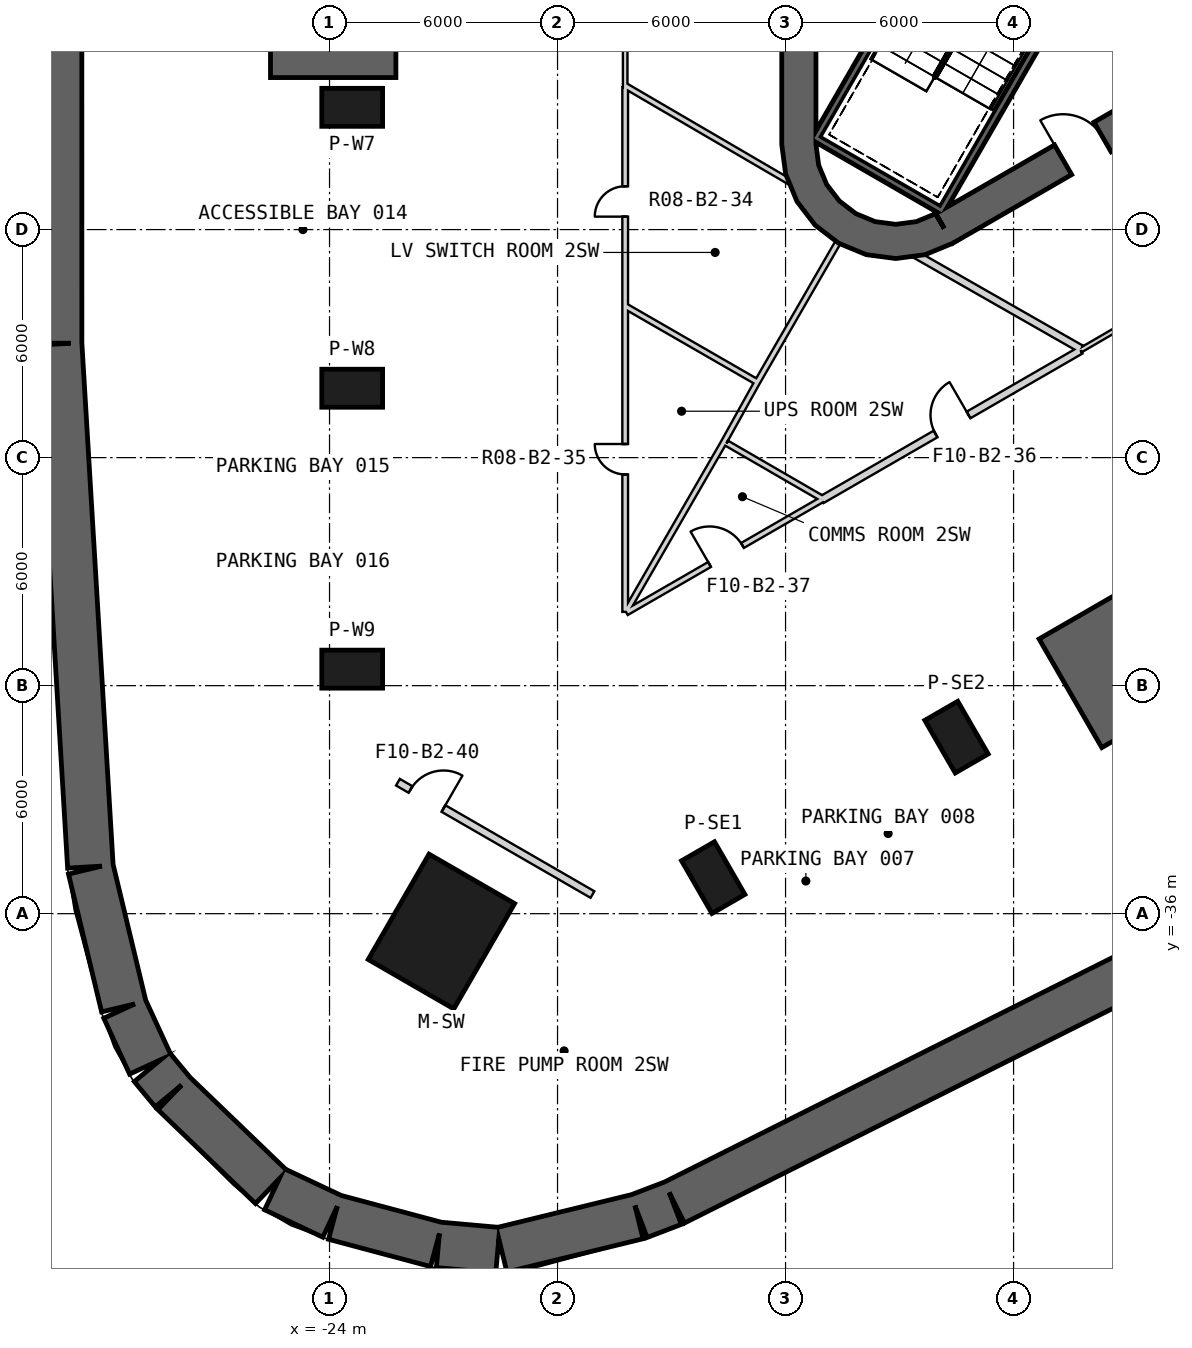
"""IFC4 building model, lengths in metres.
Left out: names, types, materials, properties, quantities, classifications, styles, units other than length and angle.
Written with IfcOpenShell. Run it as: python <this file> out.ifc"""

import sys

from ifc_helpers import new_model, si_unit, direction, frame, frame_2d, origin, origin_2d, place, context, subcontext, project, spatial, polyline, rectangle, outline, extrude, element, fill, save


model = new_model("IFC4")
c1 = context("Model", 3, precision=1e-05, world=origin(), true_north=direction((0.0, 1.0)))
c2 = subcontext(c1, "Body", "Model", "MODEL_VIEW")
j1 = project(units=[si_unit("LENGTHUNIT", "METRE"), si_unit("PLANEANGLEUNIT", "RADIAN")], contexts=[c1])
p1 = place(None, origin())
s1 = spatial("IfcSite", under=j1, at=p1, CompositionType="ELEMENT")
p2 = place(p1, origin())
s2 = spatial("IfcBuilding", under=s1, at=p2, CompositionType="ELEMENT")
p3 = place(p2, frame((0.0, 0.0, -11.0)))
s3 = spatial("IfcBuildingStorey", under=s2, at=p3, CompositionType="ELEMENT", Elevation=-11.0)
p4 = place(p3, frame((-2.344, -37.299, -0.4), z_axis=(0.0, 0.0, 1.0), x_axis=(-0.894066109634, -0.44793503056, 0.0)))
e1 = element("IfcWall", 1, at=p4, inside=s3, PredefinedType="SHEAR", context=c2, shape_type="SweptSolid", body=[
    extrude(rectangle(XDim=14.075, YDim=1.2, at=frame_2d((7.038, 0.0))), origin(), (0.0, 0.0, 1.0), 5.9),
])
p5 = place(p3, frame((-14.956, -43.615, -0.4), z_axis=(0.0, 0.0, 1.0), x_axis=(-0.934009598516, -0.357247910953, 0.0)))
e2 = element("IfcWall", 2, at=p5, inside=s3, PredefinedType="SHEAR", context=c2, shape_type="SweptSolid", body=[
    extrude(rectangle(XDim=0.964, YDim=1.2, at=frame_2d((0.482, 0.0))), origin(), (0.0, 0.0, 1.0), 5.9),
])
p6 = place(p3, frame((-15.892, -43.971, -0.4), z_axis=(0.0, 0.0, 1.0), x_axis=(-0.971425470108, -0.237344804085, 0.0)))
e3 = element("IfcWall", 3, at=p6, inside=s3, PredefinedType="SHEAR", context=c2, shape_type="SweptSolid", body=[
    extrude(rectangle(XDim=3.688, YDim=1.2, at=frame_2d((1.844, 0.0))), origin(), (0.0, 0.0, 1.0), 5.9),
])
p7 = place(p3, frame((-19.573, -44.854, -0.4), z_axis=(0.0, 0.0, 1.0), x_axis=(-0.996059823609, 0.088683864333, 0.0)))
e4 = element("IfcWall", 4, at=p7, inside=s3, PredefinedType="SHEAR", context=c2, shape_type="SweptSolid", body=[
    extrude(rectangle(XDim=1.569, YDim=1.2, at=frame_2d((0.785, 0.0))), origin(), (0.0, 0.0, 1.0), 5.9),
])
p8 = place(p3, frame((-21.186, -44.705, -0.4), z_axis=(0.0, 0.0, 1.0), x_axis=(-0.966093358166, 0.25819299624, 0.0)))
e5 = element("IfcWall", 5, at=p8, inside=s3, PredefinedType="SHEAR", context=c2, shape_type="SweptSolid", body=[
    extrude(rectangle(XDim=2.779, YDim=1.2, at=frame_2d((1.39, 0.0))), origin(), (0.0, 0.0, 1.0), 5.9),
])
p9 = place(p3, frame((-23.921, -43.969, -0.4), z_axis=(0.0, 0.0, 1.0), x_axis=(-0.904821972128, 0.425790087665, 0.0)))
e6 = element("IfcWall", 6, at=p9, inside=s3, PredefinedType="SHEAR", context=c2, shape_type="SweptSolid", body=[
    extrude(rectangle(XDim=1.692, YDim=1.2, at=frame_2d((0.846, 0.0))), origin(), (0.0, 0.0, 1.0), 5.9),
])
p10 = place(p3, frame((-25.533, -43.194, -0.4), z_axis=(0.0, 0.0, 1.0), x_axis=(-0.720885754077, 0.69305391534, 0.0)))
e7 = element("IfcWall", 7, at=p10, inside=s3, PredefinedType="SHEAR", context=c2, shape_type="SweptSolid", body=[
    extrude(rectangle(XDim=3.562, YDim=1.2, at=frame_2d((1.781, 0.0))), origin(), (0.0, 0.0, 1.0), 5.9),
])
p11 = place(p3, frame((-28.123, -40.701, -0.4), z_axis=(0.0, 0.0, 1.0), x_axis=(-0.638405236623, 0.769700431241, 0.0)))
e8 = element("IfcWall", 8, at=p11, inside=s3, PredefinedType="SHEAR", context=c2, shape_type="SweptSolid", body=[
    extrude(rectangle(XDim=0.865, YDim=1.2, at=frame_2d((0.432, 0.0))), origin(), (0.0, 0.0, 1.0), 5.9),
])
p12 = place(p3, frame((-28.717, -39.969, -0.4), z_axis=(0.0, 0.0, 1.0), x_axis=(-0.418752044047, 0.908100614253, 0.0)))
e9 = element("IfcWall", 9, at=p12, inside=s3, PredefinedType="SHEAR", context=c2, shape_type="SweptSolid", body=[
    extrude(rectangle(XDim=1.618, YDim=1.2, at=frame_2d((0.809, 0.0))), origin(), (0.0, 0.0, 1.0), 5.9),
])
p13 = place(p3, frame((-29.414, -38.444, -0.4), z_axis=(0.0, 0.0, 1.0), x_axis=(-0.233605714724, 0.972331409576, 0.0)))
e10 = element("IfcWall", 10, at=p13, inside=s3, PredefinedType="SHEAR", context=c2, shape_type="SweptSolid", body=[
    extrude(rectangle(XDim=3.729, YDim=1.2, at=frame_2d((1.865, 0.0))), origin(), (0.0, 0.0, 1.0), 5.9),
])
p14 = place(p3, frame((-30.292, -34.766, -0.4), z_axis=(0.0, 0.0, 1.0), x_axis=(-0.05979980618, 0.998210390239, 0.0)))
e11 = element("IfcWall", 11, at=p14, inside=s3, PredefinedType="SHEAR", context=c2, shape_type="SweptSolid", body=[
    extrude(rectangle(XDim=13.783, YDim=1.2, at=frame_2d((6.892, 0.0))), origin(), (0.0, 0.0, 1.0), 5.9),
])
p15 = place(p3, frame((-31.117, -20.99, -0.4), z_axis=(0.0, 0.0, 1.0), x_axis=(-6.9786511e-05, 0.999999997565, 0.0)))
e12 = element("IfcWall", 12, at=p15, inside=s3, PredefinedType="SHEAR", context=c2, shape_type="SweptSolid", body=[
    extrude(rectangle(XDim=41.981, YDim=1.2, at=frame_2d((20.99, 0.0))), origin(), (0.0, 0.0, 1.0), 5.9),
])
p16 = place(p3, frame((-21.056, -36.469, -0.4), z_axis=(0.0, 0.0, 1.0), x_axis=(-0.5, -0.866025403784, 0.0)))
e13 = element("IfcColumn", 13, at=p16, inside=s3, PredefinedType="COLUMN", context=c2, shape_type="SweptSolid", body=[
    extrude(rectangle(XDim=3.2, YDim=2.6, at=origin_2d()), origin(), (0.0, 0.0, 1.0), 5.9),
])
for number, where, z_axis, x_axis in (
    (14, (-23.403, -14.783, -0.4), (0.0, 0.0, 1.0), (-1.0, 0.0, 0.0)),
    (15, (-23.403, -22.174, -0.4), (0.0, 0.0, 1.0), (-1.0, 0.0, 0.0)),
    (16, (-23.403, -29.566, -0.4), (0.0, 0.0, 1.0), (-1.0, 0.0, 0.0)),
    (17, (-13.903, -35.051, -0.4), (0.0, 0.0, 1.0), (0.5, -0.866, 0.0)),
    (18, (-7.502, -31.355, -0.4), (0.0, 0.0, 1.0), (0.5, -0.866, 0.0)),
):
    element("IfcColumn", number, at=place(p3, frame(where, z_axis=z_axis, x_axis=x_axis)), inside=s3, PredefinedType="COLUMN", context=c2, shape_type="SweptSolid", body=[
        extrude(rectangle(XDim=1.6, YDim=1.0, at=origin_2d()), origin(), (0.0, 0.0, 1.0), 5.9),
    ])
p17 = place(p3, frame((-11.65, 15.762, -0.4), z_axis=(0.0, 0.0, 1.0), x_axis=(0.0, -1.0, 0.0)))
e19 = element("IfcWall", 19, at=p17, inside=s3, PredefinedType="SHEAR", context=c2, shape_type="SweptSolid", body=[
    extrude(rectangle(XDim=31.523, YDim=0.9, at=frame_2d((15.762, 0.0))), origin(), (0.0, 0.0, 1.0), 5.9),
])
p18 = place(p17, frame((3.612, 0.0, 0.4)))
e20 = element("IfcOpeningElement", 20, at=p18, cuts=e19, PredefinedType="OPENING", context=c2, shape_type="SweptSolid", body=[
    extrude(rectangle(XDim=1.2, YDim=2.4, at=frame_2d((0.6, 1.2))), frame((0.0, 0.46, 0.0), z_axis=(0.0, -1.0, 0.0), x_axis=(1.0, 0.0, 0.0)), (0.0, 0.0, 1.0), 0.92),
])
p19 = place(p17, frame((26.712, 0.0, 0.4)))
e21 = element("IfcOpeningElement", 21, at=p19, cuts=e19, PredefinedType="OPENING", context=c2, shape_type="SweptSolid", body=[
    extrude(rectangle(XDim=1.2, YDim=2.4, at=frame_2d((0.6, 1.2))), frame((0.0, 0.46, 0.0), z_axis=(0.0, -1.0, 0.0), x_axis=(1.0, 0.0, 0.0)), (0.0, 0.0, 1.0), 0.92),
])
p20 = place(p3, frame((-7.825, -17.97, -0.4), z_axis=(0.0, 0.0, 1.0), x_axis=(0.866028369851, 0.499994862586, 0.0)))
e22 = element("IfcWall", 22, at=p20, inside=s3, PredefinedType="SHEAR", context=c2, shape_type="SweptSolid", body=[
    extrude(rectangle(XDim=31.523, YDim=0.9, at=frame_2d((15.762, 0.0))), origin(), (0.0, 0.0, 1.0), 5.9),
])
p21 = place(p20, frame((17.862, 0.0, 0.4)))
e23 = element("IfcOpeningElement", 23, at=p21, cuts=e22, PredefinedType="OPENING", context=c2, shape_type="SweptSolid", body=[
    extrude(rectangle(XDim=1.2, YDim=2.4, at=frame_2d((0.6, 1.2))), frame((0.0, 0.46, 0.0), z_axis=(0.0, -1.0, 0.0), x_axis=(1.0, 0.0, 0.0)), (0.0, 0.0, 1.0), 0.92),
])
p22 = place(p20, frame((20.562, 0.0, 0.4)))
e24 = element("IfcOpeningElement", 24, at=p22, cuts=e22, PredefinedType="OPENING", context=c2, shape_type="SweptSolid", body=[
    extrude(rectangle(XDim=1.2, YDim=2.4, at=frame_2d((0.6, 1.2))), frame((0.0, 0.46, 0.0), z_axis=(0.0, -1.0, 0.0), x_axis=(1.0, 0.0, 0.0)), (0.0, 0.0, 1.0), 0.92),
])
p23 = place(p20, frame((26.712, 0.0, 0.4)))
e25 = element("IfcOpeningElement", 25, at=p23, cuts=e22, PredefinedType="OPENING", context=c2, shape_type="SweptSolid", body=[
    extrude(rectangle(XDim=1.2, YDim=2.4, at=frame_2d((0.6, 1.2))), frame((0.0, 0.46, 0.0), z_axis=(0.0, -1.0, 0.0), x_axis=(1.0, 0.0, 0.0)), (0.0, 0.0, 1.0), 0.92),
])
p24 = place(p20, frame((3.612, 0.0, 0.4)))
e26 = element("IfcOpeningElement", 26, at=p24, cuts=e22, PredefinedType="OPENING", context=c2, shape_type="SweptSolid", body=[
    extrude(rectangle(XDim=1.2, YDim=2.4, at=frame_2d((0.6, 1.2))), frame((0.0, 0.46, 0.0), z_axis=(0.0, -1.0, 0.0), x_axis=(1.0, 0.0, 0.0)), (0.0, 0.0, 1.0), 0.92),
])
p25 = place(p3, frame((0.0, 0.0, -0.4)))
e27 = element("IfcWall", 27, at=p25, inside=s3, PredefinedType="SHEAR", context=c2, shape_type="SweptSolid", body=[
    extrude(outline(polyline([(-12.1, -15.762), (-11.998, -16.538), (-11.698, -17.262), (-11.221, -17.883), (-10.6, -18.36), (-9.876, -18.659), (-9.1, -18.762), (-8.323, -18.659), (-7.6, -18.36), (-8.05, -17.58), (-8.556, -17.79), (-9.1, -17.862), (-9.644, -17.79), (-10.15, -17.58), (-10.585, -17.247), (-10.919, -16.812), (-11.128, -16.305), (-11.2, -15.762), (-12.1, -15.762)])), origin(), (0.0, 0.0, 1.0), 5.9),
])
p26 = place(p3, frame((0.0, 0.0, -0.4)))
e28 = element("IfcWall", 28, at=p26, inside=s3, PredefinedType="SHEAR", context=c2, shape_type="SweptSolid", body=[
    extrude(outline(polyline([(-3.678, -31.63), (-0.214, -29.63), (-1.864, -26.772), (-5.328, -28.772), (-3.678, -31.63)])), origin(), (0.0, 0.0, 1.0), 5.9),
])
p27 = place(p3, frame((0.0, 0.0, -0.4)))
e29 = element("IfcWall", 29, at=p27, inside=s3, PredefinedType="SHEAR", context=c2, shape_type="SweptSolid", body=[
    extrude(outline(polyline([(-25.553, -10.0), (-25.553, -14.0), (-22.253, -14.0), (-22.253, -10.0), (-25.553, -10.0)])), origin(), (0.0, 0.0, 1.0), 5.9),
])
p28 = place(p3, frame((-3.905, -10.563, -0.4), z_axis=(0.0, 0.0, 1.0), x_axis=(-0.500012932018, -0.866017937352, 0.0)))
e30 = element("IfcWall", 30, at=p28, inside=s3, PredefinedType="SHEAR", context=c2, shape_type="SweptSolid", body=[
    extrude(rectangle(XDim=8.1, YDim=0.2, at=frame_2d((4.05, 0.0))), origin(), (0.0, 0.0, 1.0), 5.5),
])
p29 = place(p3, frame((-11.282, -15.541, -0.4), z_axis=(0.0, 0.0, 1.0), x_axis=(0.866000483506, -0.500043160704, 0.0)))
e31 = element("IfcWall", 31, at=p29, inside=s3, PredefinedType="SHEAR", context=c2, shape_type="SweptSolid", body=[
    extrude(rectangle(XDim=3.8, YDim=0.2, at=frame_2d((1.9, 0.0))), origin(), (0.0, 0.0, 1.0), 5.5),
])
p30 = place(p3, frame((-7.196, -8.663, -0.4), z_axis=(0.0, 0.0, 1.0), x_axis=(-0.499997992926, -0.866026562566, 0.0)))
e32 = element("IfcWall", 32, at=p30, inside=s3, PredefinedType="SHEAR", context=c2, shape_type="SweptSolid", body=[
    extrude(rectangle(XDim=7.9, YDim=0.2, at=frame_2d((3.95, 0.0))), origin(), (0.0, 0.0, 1.0), 5.5),
])
p31 = place(p3, frame((-4.26, -11.524, 0.0), z_axis=(0.0, 0.0, 1.0), x_axis=(0.507997497166, -0.861358544901, 0.0)))
e33 = element("IfcWall", 33, at=p31, inside=s3, PredefinedType="PARTITIONING", context=c2, shape_type="SweptSolid", body=[
    extrude(rectangle(XDim=3.35, YDim=0.2, at=frame_2d((1.675, 0.0))), origin(), (0.0, 0.0, 1.0), 5.1),
])
p32 = place(p3, frame((-4.236, -21.175, 0.0), z_axis=(0.0, 0.0, 1.0), x_axis=(0.864433297723, 0.502747524895, 0.0)))
e34 = element("IfcWall", 34, at=p32, inside=s3, PredefinedType="PARTITIONING", context=c2, shape_type="SweptSolid", body=[
    extrude(rectangle(XDim=6.244, YDim=0.12, at=frame_2d((3.122, 0.0))), origin(), (0.0, 0.0, 1.0), 4.68),
])
p33 = place(p3, frame((-16.22, -14.256, 0.0), z_axis=(0.0, 0.0, 1.0), x_axis=(0.0, 1.0, 0.0)))
e35 = element("IfcWall", 35, at=p33, inside=s3, PredefinedType="PARTITIONING", context=c2, shape_type="SweptSolid", body=[
    extrude(rectangle(XDim=28.512, YDim=0.12, at=frame_2d((14.256, 0.0))), origin(), (0.0, 0.0, 1.0), 4.38),
])
p34 = place(p33, frame((7.194, 0.0, 0.0)))
e36 = element("IfcOpeningElement", 36, at=p34, cuts=e35, PredefinedType="OPENING", context=c2, shape_type="SweptSolid", body=[
    extrude(rectangle(XDim=1.2, YDim=2.4, at=frame_2d((0.6, 1.2))), frame((0.0, 0.07, 0.0), z_axis=(0.0, -1.0, 0.0), x_axis=(1.0, 0.0, 0.0)), (0.0, 0.0, 1.0), 0.14),
])
p35 = place(p33, frame((20.194, 0.0, 0.0)))
e37 = element("IfcOpeningElement", 37, at=p35, cuts=e35, PredefinedType="OPENING", context=c2, shape_type="SweptSolid", body=[
    extrude(rectangle(XDim=1.2, YDim=2.4, at=frame_2d((0.6, 1.2))), frame((0.0, 0.07, 0.0), z_axis=(0.0, -1.0, 0.0), x_axis=(1.0, 0.0, 0.0)), (0.0, 0.0, 1.0), 0.14),
])
p36 = place(p3, frame((-16.22, -28.059, 0.0), z_axis=(0.0, 0.0, 1.0), x_axis=(0.0, 1.0, 0.0)))
e38 = element("IfcWall", 38, at=p36, inside=s3, PredefinedType="PLUMBINGWALL", context=c2, shape_type="SweptSolid", body=[
    extrude(rectangle(XDim=13.803, YDim=0.15, at=frame_2d((6.902, 0.0))), origin(), (0.0, 0.0, 1.0), 4.07),
])
p37 = place(p36, frame((10.4, 0.0, 0.0)))
e39 = element("IfcOpeningElement", 39, at=p37, cuts=e38, PredefinedType="OPENING", context=c2, shape_type="SweptSolid", body=[
    extrude(rectangle(XDim=0.8, YDim=2.1, at=frame_2d((0.4, 1.05))), frame((0.0, 0.085, 0.0), z_axis=(0.0, -1.0, 0.0), x_axis=(1.0, 0.0, 0.0)), (0.0, 0.0, 1.0), 0.17),
])
p38 = place(p36, frame((3.617, 0.0, 0.0)))
e40 = element("IfcOpeningElement", 40, at=p38, cuts=e38, PredefinedType="OPENING", context=c2, shape_type="SweptSolid", body=[
    extrude(rectangle(XDim=0.8, YDim=2.1, at=frame_2d((0.4, 1.05))), frame((0.0, 0.085, 0.0), z_axis=(0.0, -1.0, 0.0), x_axis=(1.0, 0.0, 0.0)), (0.0, 0.0, 1.0), 0.17),
])
p39 = place(p3, frame((-11.05, -25.109, 0.0), z_axis=(0.0, 0.0, 1.0), x_axis=(0.866021255939, 0.50000718421, 0.0)))
e41 = element("IfcWall", 41, at=p39, inside=s3, PredefinedType="PARTITIONING", context=c2, shape_type="SweptSolid", body=[
    extrude(rectangle(XDim=7.868, YDim=0.2, at=frame_2d((3.934, 0.0))), origin(), (0.0, 0.0, 1.0), 4.18),
])
p40 = place(p39, frame((3.462, 0.0, 0.0)))
e42 = element("IfcOpeningElement", 42, at=p40, cuts=e41, PredefinedType="OPENING", context=c2, shape_type="SweptSolid", body=[
    extrude(rectangle(XDim=1.0, YDim=2.1, at=frame_2d((0.5, 1.05))), frame((0.0, 0.11, 0.0), z_axis=(0.0, -1.0, 0.0), x_axis=(1.0, 0.0, 0.0)), (0.0, 0.0, 1.0), 0.22),
])
p41 = place(p3, frame((-16.19, -28.077, 0.0), z_axis=(0.0, 0.0, 1.0), x_axis=(0.866017078145, 0.500014420154, 0.0)))
e43 = element("IfcWall", 43, at=p41, inside=s3, PredefinedType="PLUMBINGWALL", context=c2, shape_type="SweptSolid", body=[
    extrude(rectangle(XDim=5.935, YDim=0.15, at=frame_2d((2.968, 0.0))), origin(), (0.0, 0.0, 1.0), 4.07),
])
p42 = place(p41, frame((2.53, 0.0, 0.0)))
e44 = element("IfcOpeningElement", 44, at=p42, cuts=e43, PredefinedType="OPENING", context=c2, shape_type="SweptSolid", body=[
    extrude(rectangle(XDim=1.0, YDim=2.1, at=frame_2d((0.5, 1.05))), frame((0.0, 0.085, 0.0), z_axis=(0.0, -1.0, 0.0), x_axis=(1.0, 0.0, 0.0)), (0.0, 0.0, 1.0), 0.17),
])
p43 = place(p3, frame((-22.2, -32.541, 0.0), z_axis=(0.0, 0.0, 1.0), x_axis=(0.866020498397, -0.500008496284, 0.0)))
e45 = element("IfcWall", 45, at=p43, inside=s3, PredefinedType="PARTITIONING", context=c2, shape_type="SweptSolid", body=[
    extrude(rectangle(XDim=5.911, YDim=0.2, at=frame_2d((2.955, 0.0))), origin(), (0.0, 0.0, 1.0), 4.07),
])
p44 = place(p43, frame((0.383, 0.0, 0.0)))
e46 = element("IfcOpeningElement", 46, at=p44, cuts=e45, PredefinedType="OPENING", context=c2, shape_type="SweptSolid", body=[
    extrude(rectangle(XDim=1.0, YDim=2.1, at=frame_2d((0.5, 1.05))), frame((0.0, 0.11, 0.0), z_axis=(0.0, -1.0, 0.0), x_axis=(1.0, 0.0, 0.0)), (0.0, 0.0, 1.0), 0.22),
])
p45 = place(p3, frame((-8.707, -18.583, 0.0), z_axis=(0.0, 0.0, 1.0), x_axis=(0.868530929613, -0.495634970825, 0.0)))
e47 = element("IfcWall", 47, at=p45, inside=s3, PredefinedType="PARTITIONING", context=c2, shape_type="SweptSolid", body=[
    extrude(rectangle(XDim=5.166, YDim=0.2, at=frame_2d((2.583, 0.0))), origin(), (0.0, 0.0, 1.0), 4.18),
])
p46 = place(p3, frame((-16.2, -14.226, 0.0), z_axis=(0.0, 0.0, 1.0), x_axis=(0.863501067027, -0.504347010741, 0.0)))
e48 = element("IfcWall", 48, at=p46, inside=s3, PredefinedType="PLUMBINGWALL", context=c2, shape_type="SweptSolid", body=[
    extrude(rectangle(XDim=5.166, YDim=0.15, at=frame_2d((2.583, 0.0))), origin(), (0.0, 0.0, 1.0), 4.18),
])
p47 = place(p3, frame((-16.2, -20.023, 0.0), z_axis=(0.0, 0.0, 1.0), x_axis=(0.866525298426, -0.499133155769, 0.0)))
e49 = element("IfcWall", 49, at=p47, inside=s3, PredefinedType="PLUMBINGWALL", context=c2, shape_type="SweptSolid", body=[
    extrude(rectangle(XDim=4.018, YDim=0.15, at=frame_2d((2.009, 0.0))), origin(), (0.0, 0.0, 1.0), 4.07),
])
p48 = place(p3, frame((-10.549, -18.212, 0.0), z_axis=(0.0, 0.0, 1.0), x_axis=(-0.500006121477, -0.866021869519, 0.0)))
e50 = element("IfcWall", 50, at=p48, inside=s3, PredefinedType="PLUMBINGWALL", context=c2, shape_type="SweptSolid", body=[
    extrude(rectangle(XDim=4.42, YDim=0.15, at=frame_2d((2.21, 0.0))), origin(), (0.0, 0.0, 1.0), 4.07),
])
p49 = place(p3, frame((-12.759, -22.04, 0.0), z_axis=(0.0, 0.0, 1.0), x_axis=(-0.485722500315, -0.874113066306, 0.0)))
e51 = element("IfcWall", 51, at=p49, inside=s3, PredefinedType="PLUMBINGWALL", context=c2, shape_type="SweptSolid", body=[
    extrude(rectangle(XDim=1.823, YDim=0.15, at=frame_2d((0.912, 0.0))), origin(), (0.0, 0.0, 1.0), 4.07),
])
p50 = place(p3, frame((-16.2, -28.059, 0.0), z_axis=(0.0, 0.0, 1.0), x_axis=(0.49999374744, 0.866029013672, 0.0)))
e52 = element("IfcWall", 52, at=p50, inside=s3, PredefinedType="PLUMBINGWALL", context=c2, shape_type="SweptSolid", body=[
    extrude(rectangle(XDim=5.245, YDim=0.15, at=frame_2d((2.623, 0.0))), origin(), (0.0, 0.0, 1.0), 4.07),
])
p51 = place(p3, frame((-13.55, -23.619, 0.0), z_axis=(0.0, 0.0, 1.0), x_axis=(0.865340043372, -0.501185204627, 0.0)))
e53 = element("IfcWall", 53, at=p51, inside=s3, PredefinedType="PLUMBINGWALL", context=c2, shape_type="SweptSolid", body=[
    extrude(rectangle(XDim=2.908, YDim=0.15, at=frame_2d((1.454, 0.0))), origin(), (0.0, 0.0, 1.0), 4.07),
])
p52 = place(p37, origin())
e54 = element("IfcDoor", 54, at=p52, inside=s3, OperationType="SINGLE_SWING_LEFT", PredefinedType="USERDEFINED", context=c2, shape_type="SweptSolid", body=[
    extrude(rectangle(XDim=0.8, YDim=2.1, at=frame_2d((0.4, 1.05))), frame((0.0, 0.025, 0.0), z_axis=(0.0, -1.0, 0.0), x_axis=(1.0, 0.0, 0.0)), (0.0, 0.0, 1.0), 0.05),
])
fill(e39, e54)
p53 = place(p38, origin())
e55 = element("IfcDoor", 55, at=p53, inside=s3, OperationType="SINGLE_SWING_RIGHT", PredefinedType="USERDEFINED", context=c2, shape_type="SweptSolid", body=[
    extrude(rectangle(XDim=0.8, YDim=2.1, at=frame_2d((0.4, 1.05))), frame((0.0, 0.025, 0.0), z_axis=(0.0, -1.0, 0.0), x_axis=(1.0, 0.0, 0.0)), (0.0, 0.0, 1.0), 0.05),
])
fill(e40, e55)
p54 = place(p40, origin())
e56 = element("IfcDoor", 56, at=p54, inside=s3, OperationType="SINGLE_SWING_RIGHT", PredefinedType="USERDEFINED", context=c2, shape_type="SweptSolid", body=[
    extrude(rectangle(XDim=1.0, YDim=2.1, at=frame_2d((0.5, 1.05))), frame((0.0, 0.025, 0.0), z_axis=(0.0, -1.0, 0.0), x_axis=(1.0, 0.0, 0.0)), (0.0, 0.0, 1.0), 0.05),
])
fill(e42, e56)
p55 = place(p42, origin())
e57 = element("IfcDoor", 57, at=p55, inside=s3, OperationType="SINGLE_SWING_LEFT", PredefinedType="USERDEFINED", context=c2, shape_type="SweptSolid", body=[
    extrude(rectangle(XDim=1.0, YDim=2.1, at=frame_2d((0.5, 1.05))), frame((0.0, 0.025, 0.0), z_axis=(0.0, -1.0, 0.0), x_axis=(1.0, 0.0, 0.0)), (0.0, 0.0, 1.0), 0.05),
])
fill(e44, e57)
p56 = place(p44, origin())
e58 = element("IfcDoor", 58, at=p56, inside=s3, OperationType="SINGLE_SWING_RIGHT", PredefinedType="USERDEFINED", context=c2, shape_type="SweptSolid", body=[
    extrude(rectangle(XDim=1.0, YDim=2.1, at=frame_2d((0.5, 1.05))), frame((0.0, 0.025, 0.0), z_axis=(0.0, -1.0, 0.0), x_axis=(1.0, 0.0, 0.0)), (0.0, 0.0, 1.0), 0.05),
])
fill(e46, e58)
p57 = place(p24, origin())
e59 = element("IfcDoor", 59, at=p57, inside=s3, OperationType="SINGLE_SWING_LEFT", PredefinedType="USERDEFINED", context=c2, shape_type="SweptSolid", body=[
    extrude(rectangle(XDim=1.2, YDim=2.4, at=frame_2d((0.6, 1.2))), frame((0.0, 0.025, 0.0), z_axis=(0.0, -1.0, 0.0), x_axis=(1.0, 0.0, 0.0)), (0.0, 0.0, 1.0), 0.05),
])
fill(e26, e59)
save(model, sys.argv[1])
